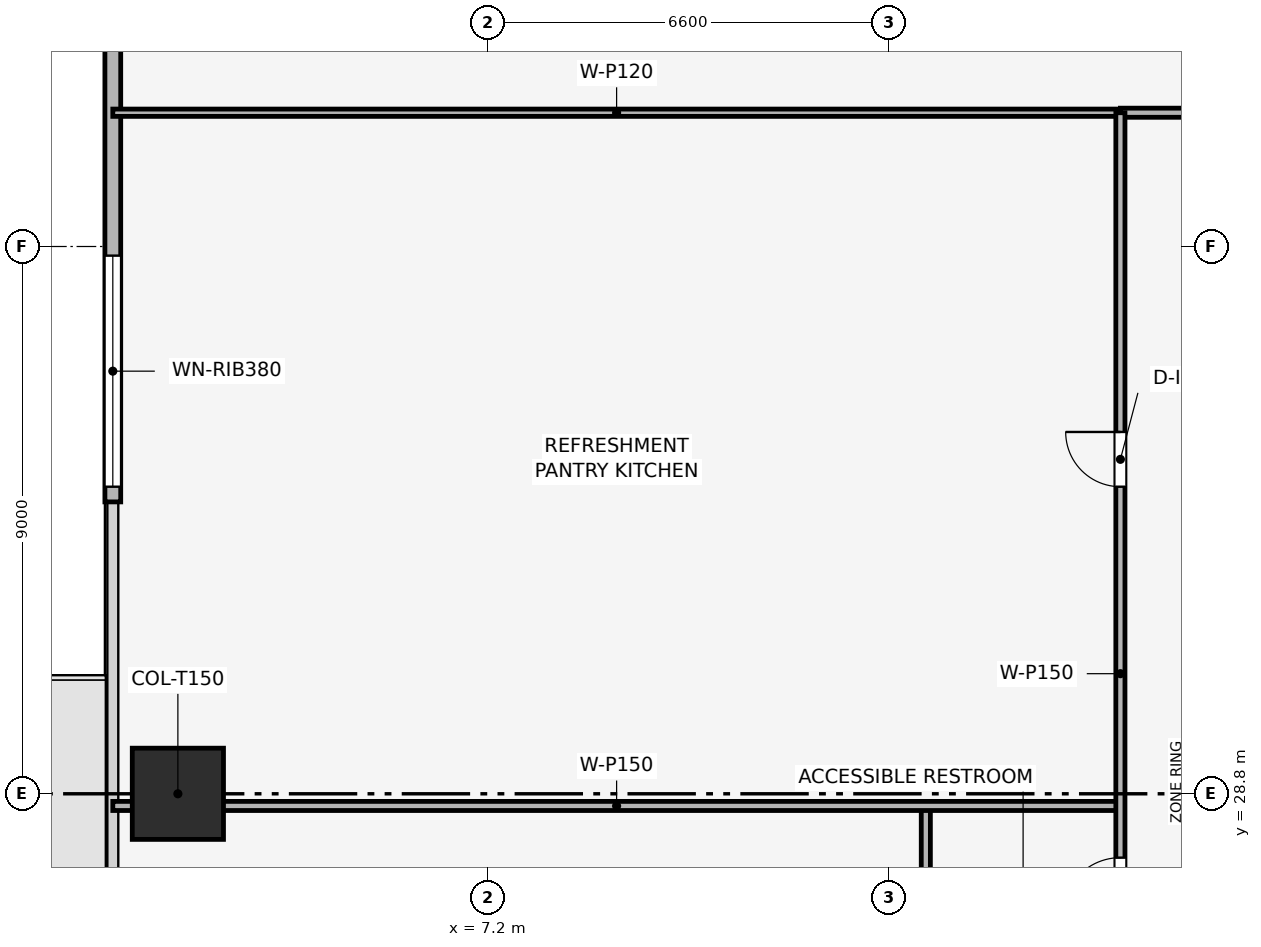
"""IFC4 building model, lengths in metres.
Left out: names, types, materials, properties, quantities, classifications, styles, units other than length and angle.
Written with IfcOpenShell. Run it as: python <this file> out.ifc"""

import sys

from ifc_helpers import new_model, si_unit, direction, frame, frame_2d, origin, origin_2d, place, context, subcontext, project, spatial, rectangle, extrude, element, fill, save


model = new_model("IFC4")
c1 = context("Model", 3, precision=1e-05, world=origin(), true_north=direction((0.0, 1.0)))
c2 = subcontext(c1, "Body", "Model", "MODEL_VIEW")
j1 = project(units=[si_unit("LENGTHUNIT", "METRE"), si_unit("PLANEANGLEUNIT", "RADIAN")], contexts=[c1])
p1 = place(None, origin())
s1 = spatial("IfcSite", under=j1, at=p1, CompositionType="ELEMENT")
p2 = place(p1, origin())
s2 = spatial("IfcBuilding", under=s1, at=p2, CompositionType="ELEMENT")
p3 = place(p2, frame((0.0, 0.0, 84.6)))
s3 = spatial("IfcBuildingStorey", under=s2, at=p3, CompositionType="ELEMENT", Elevation=84.6)
p4 = place(p3, frame((2.1, 28.8, 0.003), z_axis=(0.0, 0.0, 1.0), x_axis=(1.0, 0.0, 0.0)))
e1 = element("IfcColumn", 1, at=p4, inside=s3, PredefinedType="COLUMN", context=c2, shape_type="SweptSolid", body=[
    extrude(rectangle(XDim=1.5, YDim=1.5, at=origin_2d()), origin(), (0.0, 0.0, 1.0), 3.644),
])
p5 = place(p3, frame((1.03, 33.6, 0.0), z_axis=(0.0, 0.0, 1.0), x_axis=(0.0, 1.0, 0.0)))
e2 = element("IfcWall", 2, at=p5, inside=s3, PredefinedType="SOLIDWALL", context=c2, shape_type="SweptSolid", body=[
    extrude(rectangle(XDim=15.3, YDim=0.26, at=frame_2d((7.65, 0.0))), origin(), (0.0, 0.0, 1.0), 3.65),
])
p6 = place(p5, frame((0.25, 0.0, 0.9)))
e3 = element("IfcOpeningElement", 3, at=p6, cuts=e2, PredefinedType="OPENING", context=c2, shape_type="SweptSolid", body=[
    extrude(rectangle(XDim=3.8, YDim=1.9, at=frame_2d((1.9, 0.95))), frame((0.0, 0.14, 0.0), z_axis=(0.0, -1.0, 0.0), x_axis=(1.0, 0.0, 0.0)), (0.0, 0.0, 1.0), 0.28),
])
p7 = place(p3, frame((1.03, 40.0, 0.0), z_axis=(0.0, 0.0, 1.0), x_axis=(1.0, 0.0, 0.0)))
e4 = element("IfcWall", 4, at=p7, inside=s3, PredefinedType="PARTITIONING", context=c2, shape_type="SweptSolid", body=[
    extrude(rectangle(XDim=16.57, YDim=0.12, at=frame_2d((8.285, 0.0))), origin(), (0.0, 0.0, 1.0), 2.935),
])
p8 = place(p3, frame((14.4, 20.2, 0.0), z_axis=(0.0, 0.0, 1.0), x_axis=(0.0, 1.0, 0.0)))
e5 = element("IfcWall", 5, at=p8, inside=s3, PredefinedType="PARTITIONING", context=c2, shape_type="SweptSolid", body=[
    extrude(rectangle(XDim=8.4, YDim=0.15, at=frame_2d((4.2, 0.0))), origin(), (0.0, 0.0, 1.0), 3.085),
])
p9 = place(p3, frame((1.03, 28.6, 0.0), z_axis=(0.0, 0.0, 1.0), x_axis=(1.0, 0.0, 0.0)))
e6 = element("IfcWall", 6, at=p9, inside=s3, PredefinedType="PARTITIONING", context=c2, shape_type="SweptSolid", body=[
    extrude(rectangle(XDim=16.57, YDim=0.15, at=frame_2d((8.285, 0.0))), origin(), (0.0, 0.0, 1.0), 2.935),
])
p10 = place(p3, frame((17.6, 40.0, 0.0), z_axis=(0.0, 0.0, 1.0), x_axis=(1.0, 0.0, 0.0)))
e7 = element("IfcWall", 7, at=p10, inside=s3, PredefinedType="PARTITIONING", context=c2, shape_type="SweptSolid", body=[
    extrude(rectangle(XDim=22.4, YDim=0.15, at=frame_2d((11.2, 0.0))), origin(), (0.0, 0.0, 1.0), 3.085),
])
p11 = place(p10, frame((4.349, 0.0, 0.0)))
e8 = element("IfcOpeningElement", 8, at=p11, cuts=e7, PredefinedType="OPENING", context=c2, shape_type="SweptSolid", body=[
    extrude(rectangle(XDim=0.9, YDim=2.1, at=frame_2d((0.45, 1.05))), frame((0.0, 0.085, 0.0), z_axis=(0.0, -1.0, 0.0), x_axis=(1.0, 0.0, 0.0)), (0.0, 0.0, 1.0), 0.17),
])
p12 = place(p10, frame((15.549, 0.0, 0.0)))
e9 = element("IfcOpeningElement", 9, at=p12, cuts=e7, PredefinedType="OPENING", context=c2, shape_type="SweptSolid", body=[
    extrude(rectangle(XDim=0.9, YDim=2.1, at=frame_2d((0.45, 1.05))), frame((0.0, 0.085, 0.0), z_axis=(0.0, -1.0, 0.0), x_axis=(1.0, 0.0, 0.0)), (0.0, 0.0, 1.0), 0.17),
])
p13 = place(p3, frame((17.6, 17.6, 0.0), z_axis=(0.0, 0.0, 1.0), x_axis=(0.0, 1.0, 0.0)))
e10 = element("IfcWall", 10, at=p13, inside=s3, PredefinedType="PARTITIONING", context=c2, shape_type="SweptSolid", body=[
    extrude(rectangle(XDim=22.4, YDim=0.15, at=frame_2d((11.2, 0.0))), origin(), (0.0, 0.0, 1.0), 3.085),
])
p14 = place(p13, frame((0.85, 0.0, 0.0)))
e11 = element("IfcOpeningElement", 11, at=p14, cuts=e10, PredefinedType="OPENING", context=c2, shape_type="SweptSolid", body=[
    extrude(rectangle(XDim=0.9, YDim=2.1, at=frame_2d((0.45, 1.05))), frame((0.0, 0.085, 0.0), z_axis=(0.0, -1.0, 0.0), x_axis=(1.0, 0.0, 0.0)), (0.0, 0.0, 1.0), 0.17),
])
p15 = place(p13, frame((3.55, 0.0, 0.0)))
e12 = element("IfcOpeningElement", 12, at=p15, cuts=e10, PredefinedType="OPENING", context=c2, shape_type="SweptSolid", body=[
    extrude(rectangle(XDim=0.9, YDim=2.1, at=frame_2d((0.45, 1.05))), frame((0.0, 0.085, 0.0), z_axis=(0.0, -1.0, 0.0), x_axis=(1.0, 0.0, 0.0)), (0.0, 0.0, 1.0), 0.17),
])
p16 = place(p13, frame((6.45, 0.0, 0.0)))
e13 = element("IfcOpeningElement", 13, at=p16, cuts=e10, PredefinedType="OPENING", context=c2, shape_type="SweptSolid", body=[
    extrude(rectangle(XDim=0.9, YDim=2.1, at=frame_2d((0.45, 1.05))), frame((0.0, 0.085, 0.0), z_axis=(0.0, -1.0, 0.0), x_axis=(1.0, 0.0, 0.0)), (0.0, 0.0, 1.0), 0.17),
])
p17 = place(p13, frame((9.2, 0.0, 0.0)))
e14 = element("IfcOpeningElement", 14, at=p17, cuts=e10, PredefinedType="OPENING", context=c2, shape_type="SweptSolid", body=[
    extrude(rectangle(XDim=0.95, YDim=2.1, at=frame_2d((0.475, 1.05))), frame((0.0, 0.085, 0.0), z_axis=(0.0, -1.0, 0.0), x_axis=(1.0, 0.0, 0.0)), (0.0, 0.0, 1.0), 0.17),
])
p18 = place(p13, frame((16.25, 0.0, 0.0)))
e15 = element("IfcOpeningElement", 15, at=p18, cuts=e10, PredefinedType="OPENING", context=c2, shape_type="SweptSolid", body=[
    extrude(rectangle(XDim=0.9, YDim=2.1, at=frame_2d((0.45, 1.05))), frame((0.0, 0.085, 0.0), z_axis=(0.0, -1.0, 0.0), x_axis=(1.0, 0.0, 0.0)), (0.0, 0.0, 1.0), 0.17),
])
p19 = place(p6, origin())
e16 = element("IfcWindow", 16, at=p19, inside=s3, PartitioningType="SINGLE_PANEL", PredefinedType="WINDOW", context=c2, shape_type="SweptSolid", body=[
    extrude(rectangle(XDim=3.8, YDim=1.9, at=frame_2d((1.9, 0.95))), frame((0.0, 0.03, 0.0), z_axis=(0.0, -1.0, 0.0), x_axis=(1.0, 0.0, 0.0)), (0.0, 0.0, 1.0), 0.06),
])
fill(e3, e16)
p20 = place(p17, origin())
e17 = element("IfcDoor", 17, at=p20, inside=s3, OperationType="SINGLE_SWING_LEFT", PredefinedType="DOOR", context=c2, shape_type="SweptSolid", body=[
    extrude(rectangle(XDim=0.95, YDim=2.1, at=frame_2d((0.475, 1.05))), frame((0.0, 0.025, 0.0), z_axis=(0.0, -1.0, 0.0), x_axis=(1.0, 0.0, 0.0)), (0.0, 0.0, 1.0), 0.05),
])
fill(e14, e17)
p21 = place(p18, origin())
e18 = element("IfcDoor", 18, at=p21, inside=s3, OperationType="SINGLE_SWING_RIGHT", PredefinedType="DOOR", context=c2, shape_type="SweptSolid", body=[
    extrude(rectangle(XDim=0.9, YDim=2.1, at=frame_2d((0.45, 1.05))), frame((0.0, 0.025, 0.0), z_axis=(0.0, -1.0, 0.0), x_axis=(1.0, 0.0, 0.0)), (0.0, 0.0, 1.0), 0.05),
])
fill(e15, e18)
save(model, sys.argv[1])
